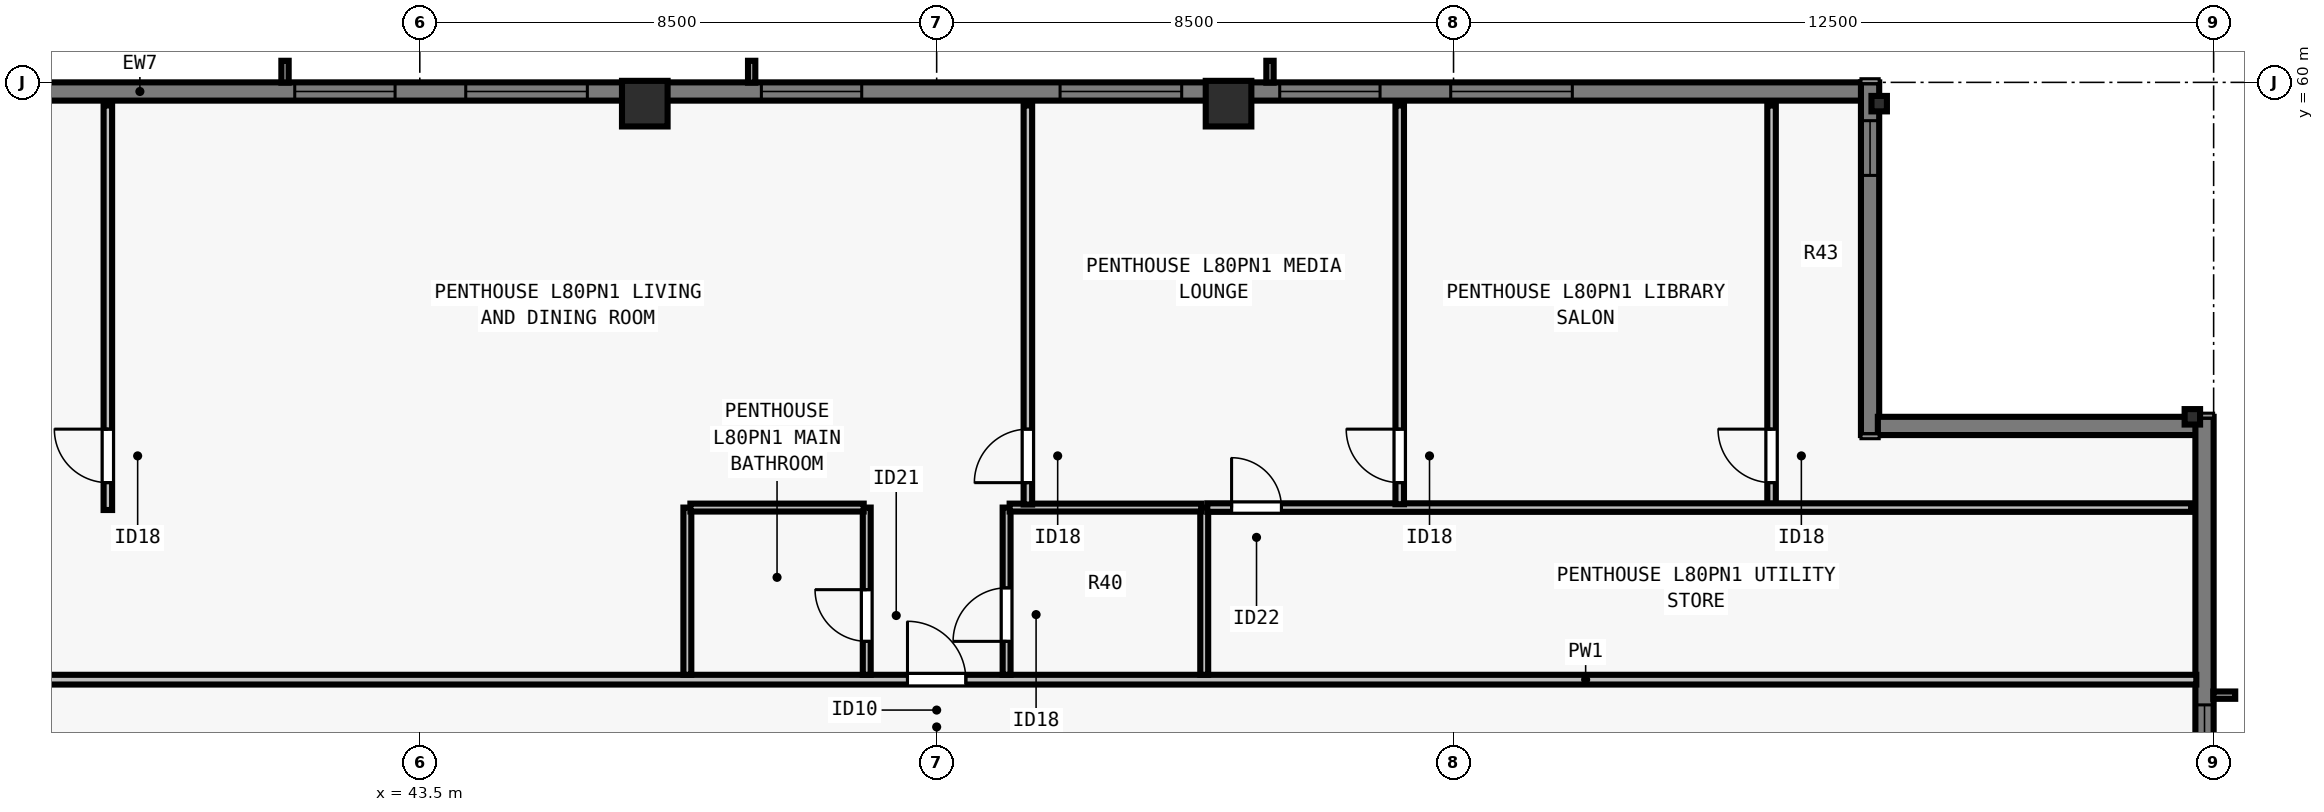
"""IFC4 building model, lengths in metres.
Left out: names, types, materials, properties, quantities, classifications, styles, units other than length and angle.
Written with IfcOpenShell. Run it as: python <this file> out.ifc"""

import sys

from ifc_helpers import new_model, si_unit, direction, frame, frame_2d, origin, origin_2d, place, context, subcontext, project, spatial, rectangle, i_section, extrude, element, fill, save


model = new_model("IFC4")
c1 = context("Model", 3, precision=1e-05, world=origin(), true_north=direction((0.0, 1.0)))
c2 = subcontext(c1, "Body", "Model", "MODEL_VIEW")
j1 = project(units=[si_unit("LENGTHUNIT", "METRE"), si_unit("PLANEANGLEUNIT", "RADIAN")], contexts=[c1])
p1 = place(None, origin())
s1 = spatial("IfcSite", under=j1, at=p1, CompositionType="ELEMENT")
p2 = place(p1, origin())
s2 = spatial("IfcBuilding", under=s1, at=p2, CompositionType="ELEMENT")
p3 = place(p2, frame((0.0, 0.0, 291.0)))
s3 = spatial("IfcBuildingStorey", under=s2, at=p3, CompositionType="ELEMENT", Elevation=291.0)
for number, where, z_axis, x_axis in (
    (1, (72.65, 54.5, 0.0), (0.0, 0.0, 1.0), (0.0, 1.0, 0.0)),
    (2, (67.5, 59.65, 0.0), (0.0, 0.0, 1.0), (1.0, 0.0, 0.0)),
):
    element("IfcColumn", number, at=place(p3, frame(where, z_axis=z_axis, x_axis=x_axis)), inside=s3, PredefinedType="COLUMN", context=c2, shape_type="SweptSolid", body=[
        extrude(i_section(OverallWidth=0.254, OverallDepth=0.254, WebThickness=0.009, FlangeThickness=0.014, FilletRadius=0.013, at=origin_2d()), origin(), (0.0, 0.0, 1.0), 3.5),
    ])
for number, where, z_axis, x_axis in (
    (3, (56.8, 59.65, 0.0), (0.0, 0.0, 1.0), (1.0, 0.0, 0.0)),
    (4, (47.2, 59.65, 0.0), (0.0, 0.0, 1.0), (1.0, 0.0, 0.0)),
):
    element("IfcColumn", number, at=place(p3, frame(where, z_axis=z_axis, x_axis=x_axis)), inside=s3, PredefinedType="COLUMN", context=c2, shape_type="SweptSolid", body=[
        extrude(rectangle(XDim=0.75, YDim=0.75, at=origin_2d()), origin(), (0.0, 0.0, 1.0), 3.5),
    ])
p4 = place(p3, frame((36.5, 59.85, 0.0), z_axis=(0.0, 0.0, 1.0), x_axis=(1.0, 0.0, 0.0)))
e5 = element("IfcWall", 5, at=p4, inside=s3, PredefinedType="SOLIDWALL", context=c2, shape_type="SweptSolid", body=[
    extrude(rectangle(XDim=30.722, YDim=0.3, at=frame_2d((15.361, 0.0))), origin(), (0.0, 0.0, 1.0), 3.29),
])
p5 = place(p4, frame((4.944, 0.0, 0.8)))
e6 = element("IfcOpeningElement", 6, at=p5, cuts=e5, PredefinedType="OPENING", context=c2, shape_type="SweptSolid", body=[
    extrude(rectangle(XDim=1.65, YDim=1.758, at=frame_2d((0.825, 0.879))), frame((0.0, 0.16, 0.0), z_axis=(0.0, -1.0, 0.0), x_axis=(1.0, 0.0, 0.0)), (0.0, 0.0, 1.0), 0.32),
])
p6 = place(p4, frame((7.756, 0.0, 0.8)))
e7 = element("IfcOpeningElement", 7, at=p6, cuts=e5, PredefinedType="OPENING", context=c2, shape_type="SweptSolid", body=[
    extrude(rectangle(XDim=2.0, YDim=1.758, at=frame_2d((1.0, 0.879))), frame((0.0, 0.16, 0.0), z_axis=(0.0, -1.0, 0.0), x_axis=(1.0, 0.0, 0.0)), (0.0, 0.0, 1.0), 0.32),
])
p7 = place(p4, frame((12.617, 0.0, 0.8)))
e8 = element("IfcOpeningElement", 8, at=p7, cuts=e5, PredefinedType="OPENING", context=c2, shape_type="SweptSolid", body=[
    extrude(rectangle(XDim=1.65, YDim=1.758, at=frame_2d((0.825, 0.879))), frame((0.0, 0.16, 0.0), z_axis=(0.0, -1.0, 0.0), x_axis=(1.0, 0.0, 0.0)), (0.0, 0.0, 1.0), 0.32),
])
p8 = place(p4, frame((17.53, 0.0, 0.8)))
e9 = element("IfcOpeningElement", 9, at=p8, cuts=e5, PredefinedType="OPENING", context=c2, shape_type="SweptSolid", body=[
    extrude(rectangle(XDim=2.0, YDim=1.758, at=frame_2d((1.0, 0.879))), frame((0.0, 0.16, 0.0), z_axis=(0.0, -1.0, 0.0), x_axis=(1.0, 0.0, 0.0)), (0.0, 0.0, 1.0), 0.32),
])
p9 = place(p4, frame((21.142, 0.0, 0.8)))
e10 = element("IfcOpeningElement", 10, at=p9, cuts=e5, PredefinedType="OPENING", context=c2, shape_type="SweptSolid", body=[
    extrude(rectangle(XDim=1.65, YDim=1.758, at=frame_2d((0.825, 0.879))), frame((0.0, 0.16, 0.0), z_axis=(0.0, -1.0, 0.0), x_axis=(1.0, 0.0, 0.0)), (0.0, 0.0, 1.0), 0.32),
])
p10 = place(p4, frame((23.954, 0.0, 0.8)))
e11 = element("IfcOpeningElement", 11, at=p10, cuts=e5, PredefinedType="OPENING", context=c2, shape_type="SweptSolid", body=[
    extrude(rectangle(XDim=2.0, YDim=1.758, at=frame_2d((1.0, 0.879))), frame((0.0, 0.16, 0.0), z_axis=(0.0, -1.0, 0.0), x_axis=(1.0, 0.0, 0.0)), (0.0, 0.0, 1.0), 0.32),
])
p11 = place(p3, frame((67.35, 60.0, 0.0), z_axis=(0.0, 0.0, 1.0), x_axis=(0.0, -1.0, 0.0)))
e12 = element("IfcWall", 12, at=p11, inside=s3, PredefinedType="SOLIDWALL", context=c2, shape_type="SweptSolid", body=[
    extrude(rectangle(XDim=5.8, YDim=0.3, at=frame_2d((2.9, 0.0))), origin(), (0.0, 0.0, 1.0), 3.29),
])
p12 = place(p11, frame((0.63, 0.0, 0.8)))
e13 = element("IfcOpeningElement", 13, at=p12, cuts=e12, PredefinedType="OPENING", context=c2, shape_type="SweptSolid", body=[
    extrude(rectangle(XDim=0.9, YDim=1.75, at=frame_2d((0.45, 0.875))), frame((0.0, 0.16, 0.0), z_axis=(0.0, -1.0, 0.0), x_axis=(1.0, 0.0, 0.0)), (0.0, 0.0, 1.0), 0.32),
])
p13 = place(p3, frame((67.478, 54.35, 0.0), z_axis=(0.0, 0.0, 1.0), x_axis=(1.0, 0.0, 0.0)))
e14 = element("IfcWall", 14, at=p13, inside=s3, PredefinedType="SOLIDWALL", context=c2, shape_type="SweptSolid", body=[
    extrude(rectangle(XDim=5.244, YDim=0.3, at=frame_2d((2.622, 0.0))), origin(), (0.0, 0.0, 1.0), 3.29),
])
p14 = place(p3, frame((72.85, 54.5, 0.0), z_axis=(0.0, 0.0, 1.0), x_axis=(0.0, -1.0, 0.0)))
e15 = element("IfcWall", 15, at=p14, inside=s3, PredefinedType="SOLIDWALL", context=c2, shape_type="SweptSolid", body=[
    extrude(rectangle(XDim=22.222, YDim=0.3, at=frame_2d((11.111, 0.0))), origin(), (0.0, 0.0, 1.0), 3.29),
])
p15 = place(p14, frame((4.737, 0.0, 0.8)))
e16 = element("IfcOpeningElement", 16, at=p15, cuts=e15, PredefinedType="OPENING", context=c2, shape_type="SweptSolid", body=[
    extrude(rectangle(XDim=1.65, YDim=1.758, at=frame_2d((0.825, 0.879))), frame((0.0, 0.16, 0.0), z_axis=(0.0, -1.0, 0.0), x_axis=(1.0, 0.0, 0.0)), (0.0, 0.0, 1.0), 0.32),
])
p16 = place(p14, frame((7.987, 0.0, 0.8)))
e17 = element("IfcOpeningElement", 17, at=p16, cuts=e15, PredefinedType="OPENING", context=c2, shape_type="SweptSolid", body=[
    extrude(rectangle(XDim=2.0, YDim=1.758, at=frame_2d((1.0, 0.879))), frame((0.0, 0.16, 0.0), z_axis=(0.0, -1.0, 0.0), x_axis=(1.0, 0.0, 0.0)), (0.0, 0.0, 1.0), 0.32),
])
p17 = place(p14, frame((11.586, 0.0, 0.8)))
e18 = element("IfcOpeningElement", 18, at=p17, cuts=e15, PredefinedType="OPENING", context=c2, shape_type="SweptSolid", body=[
    extrude(rectangle(XDim=1.65, YDim=1.758, at=frame_2d((0.825, 0.879))), frame((0.0, 0.16, 0.0), z_axis=(0.0, -1.0, 0.0), x_axis=(1.0, 0.0, 0.0)), (0.0, 0.0, 1.0), 0.32),
])
p18 = place(p14, frame((14.835, 0.0, 0.8)))
e19 = element("IfcOpeningElement", 19, at=p18, cuts=e15, PredefinedType="OPENING", context=c2, shape_type="SweptSolid", body=[
    extrude(rectangle(XDim=2.0, YDim=1.758, at=frame_2d((1.0, 0.879))), frame((0.0, 0.16, 0.0), z_axis=(0.0, -1.0, 0.0), x_axis=(1.0, 0.0, 0.0)), (0.0, 0.0, 1.0), 0.32),
])
p19 = place(p14, frame((17.985, 0.0, 0.8)))
e20 = element("IfcOpeningElement", 20, at=p19, cuts=e15, PredefinedType="OPENING", context=c2, shape_type="SweptSolid", body=[
    extrude(rectangle(XDim=1.65, YDim=1.758, at=frame_2d((0.825, 0.879))), frame((0.0, 0.16, 0.0), z_axis=(0.0, -1.0, 0.0), x_axis=(1.0, 0.0, 0.0)), (0.0, 0.0, 1.0), 0.32),
])
p20 = place(p3, frame((31.285, 50.177, 0.0), z_axis=(0.0, 0.0, 1.0), x_axis=(1.0, 0.0, 0.0)))
e21 = element("IfcWall", 21, at=p20, inside=s3, PredefinedType="PARTITIONING", context=c2, shape_type="SweptSolid", body=[
    extrude(rectangle(XDim=41.43, YDim=0.16, at=frame_2d((20.715, 0.0))), origin(), (0.0, 0.0, 1.0), 3.009),
])
p21 = place(p20, frame((20.235, 0.0, 0.0)))
e22 = element("IfcOpeningElement", 22, at=p21, cuts=e21, PredefinedType="OPENING", context=c2, shape_type="SweptSolid", body=[
    extrude(rectangle(XDim=0.96, YDim=2.18, at=frame_2d((0.48, 1.09))), frame((0.0, 0.09, 0.0), z_axis=(0.0, -1.0, 0.0), x_axis=(1.0, 0.0, 0.0)), (0.0, 0.0, 1.0), 0.18),
])
p22 = place(p3, frame((47.9, 50.258, 0.0), z_axis=(0.0, 0.0, 1.0), x_axis=(0.0, 1.0, 0.0)))
e23 = element("IfcWall", 23, at=p22, inside=s3, PredefinedType="PLUMBINGWALL", context=c2, shape_type="SweptSolid", body=[
    extrude(rectangle(XDim=2.75, YDim=0.13, at=frame_2d((1.375, 0.0))), origin(), (0.0, 0.0, 1.0), 3.29),
])
p23 = place(p3, frame((50.85, 50.258, 0.0), z_axis=(0.0, 0.0, 1.0), x_axis=(0.0, 1.0, 0.0)))
e24 = element("IfcWall", 24, at=p23, inside=s3, PredefinedType="PLUMBINGWALL", context=c2, shape_type="SweptSolid", body=[
    extrude(rectangle(XDim=2.75, YDim=0.13, at=frame_2d((1.375, 0.0))), origin(), (0.0, 0.0, 1.0), 3.009),
])
p24 = place(p23, frame((0.55, 0.0, 0.0)))
e25 = element("IfcOpeningElement", 25, at=p24, cuts=e24, PredefinedType="OPENING", context=c2, shape_type="SweptSolid", body=[
    extrude(rectangle(XDim=0.85, YDim=2.08, at=frame_2d((0.425, 1.04))), frame((0.0, 0.075, 0.0), z_axis=(0.0, -1.0, 0.0), x_axis=(1.0, 0.0, 0.0)), (0.0, 0.0, 1.0), 0.15),
])
p25 = place(p3, frame((47.95, 53.008, 0.0), z_axis=(0.0, 0.0, 1.0), x_axis=(1.0, 0.0, 0.0)))
e26 = element("IfcWall", 26, at=p25, inside=s3, PredefinedType="PLUMBINGWALL", context=c2, shape_type="SweptSolid", body=[
    extrude(rectangle(XDim=2.85, YDim=0.13, at=frame_2d((1.425, 0.0))), origin(), (0.0, 0.0, 1.0), 3.29),
])
p26 = place(p3, frame((56.4, 50.258, 0.0), z_axis=(0.0, 0.0, 1.0), x_axis=(0.0, 1.0, 0.0)))
e27 = element("IfcWall", 27, at=p26, inside=s3, PredefinedType="PLUMBINGWALL", context=c2, shape_type="SweptSolid", body=[
    extrude(rectangle(XDim=2.75, YDim=0.13, at=frame_2d((1.375, 0.0))), origin(), (0.0, 0.0, 1.0), 3.29),
])
p27 = place(p3, frame((53.15, 50.258, 0.0), z_axis=(0.0, 0.0, 1.0), x_axis=(0.0, 1.0, 0.0)))
e28 = element("IfcWall", 28, at=p27, inside=s3, PredefinedType="PLUMBINGWALL", context=c2, shape_type="SweptSolid", body=[
    extrude(rectangle(XDim=2.75, YDim=0.13, at=frame_2d((1.375, 0.0))), origin(), (0.0, 0.0, 1.0), 3.29),
])
p28 = place(p27, frame((0.55, 0.0, 0.0)))
e29 = element("IfcOpeningElement", 29, at=p28, cuts=e28, PredefinedType="OPENING", context=c2, shape_type="SweptSolid", body=[
    extrude(rectangle(XDim=0.88, YDim=2.1, at=frame_2d((0.44, 1.05))), frame((0.0, 0.075, 0.0), z_axis=(0.0, -1.0, 0.0), x_axis=(1.0, 0.0, 0.0)), (0.0, 0.0, 1.0), 0.15),
])
p29 = place(p3, frame((53.2, 53.008, 0.0), z_axis=(0.0, 0.0, 1.0), x_axis=(1.0, 0.0, 0.0)))
e30 = element("IfcWall", 30, at=p29, inside=s3, PredefinedType="PLUMBINGWALL", context=c2, shape_type="SweptSolid", body=[
    extrude(rectangle(XDim=3.15, YDim=0.13, at=frame_2d((1.575, 0.0))), origin(), (0.0, 0.0, 1.0), 3.29),
])
p30 = place(p3, frame((38.37, 52.968, 0.0), z_axis=(0.0, 0.0, 1.0), x_axis=(0.0, 1.0, 0.0)))
e31 = element("IfcWall", 31, at=p30, inside=s3, PredefinedType="PARTITIONING", context=c2, shape_type="SweptSolid", body=[
    extrude(rectangle(XDim=6.653, YDim=0.14, at=frame_2d((3.326, 0.0))), origin(), (0.0, 0.0, 1.0), 2.653),
])
p31 = place(p30, frame((0.45, 0.0, 0.0)))
e32 = element("IfcOpeningElement", 32, at=p31, cuts=e31, PredefinedType="OPENING", context=c2, shape_type="SweptSolid", body=[
    extrude(rectangle(XDim=0.88, YDim=2.1, at=frame_2d((0.44, 1.05))), frame((0.0, 0.08, 0.0), z_axis=(0.0, -1.0, 0.0), x_axis=(1.0, 0.0, 0.0)), (0.0, 0.0, 1.0), 0.16),
])
p32 = place(p3, frame((65.73, 52.968, 0.0), z_axis=(0.0, 0.0, 1.0), x_axis=(0.0, 1.0, 0.0)))
e33 = element("IfcWall", 33, at=p32, inside=s3, PredefinedType="PARTITIONING", context=c2, shape_type="SweptSolid", body=[
    extrude(rectangle(XDim=6.653, YDim=0.14, at=frame_2d((3.326, 0.0))), origin(), (0.0, 0.0, 1.0), 2.653),
])
p33 = place(p32, frame((0.45, 0.0, 0.0)))
e34 = element("IfcOpeningElement", 34, at=p33, cuts=e33, PredefinedType="OPENING", context=c2, shape_type="SweptSolid", body=[
    extrude(rectangle(XDim=0.88, YDim=2.1, at=frame_2d((0.44, 1.05))), frame((0.0, 0.08, 0.0), z_axis=(0.0, -1.0, 0.0), x_axis=(1.0, 0.0, 0.0)), (0.0, 0.0, 1.0), 0.16),
])
p34 = place(p3, frame((56.45, 53.008, 0.0), z_axis=(0.0, 0.0, 1.0), x_axis=(1.0, 0.0, 0.0)))
e35 = element("IfcWall", 35, at=p34, inside=s3, PredefinedType="PARTITIONING", context=c2, shape_type="SweptSolid", body=[
    extrude(rectangle(XDim=16.18, YDim=0.14, at=frame_2d((8.09, 0.0))), origin(), (0.0, 0.0, 1.0), 3.009),
])
p35 = place(p34, frame((0.4, 0.0, 0.0)))
e36 = element("IfcOpeningElement", 36, at=p35, cuts=e35, PredefinedType="OPENING", context=c2, shape_type="SweptSolid", body=[
    extrude(rectangle(XDim=0.82, YDim=2.1, at=frame_2d((0.41, 1.05))), frame((0.0, 0.08, 0.0), z_axis=(0.0, -1.0, 0.0), x_axis=(1.0, 0.0, 0.0)), (0.0, 0.0, 1.0), 0.16),
])
p36 = place(p3, frame((53.5, 53.058, 0.0), z_axis=(0.0, 0.0, 1.0), x_axis=(0.0, 1.0, 0.0)))
e37 = element("IfcWall", 37, at=p36, inside=s3, PredefinedType="PARTITIONING", context=c2, shape_type="SweptSolid", body=[
    extrude(rectangle(XDim=6.562, YDim=0.14, at=frame_2d((3.281, 0.0))), origin(), (0.0, 0.0, 1.0), 3.009),
])
p37 = place(p36, frame((0.36, 0.0, 0.0)))
e38 = element("IfcOpeningElement", 38, at=p37, cuts=e37, PredefinedType="OPENING", context=c2, shape_type="SweptSolid", body=[
    extrude(rectangle(XDim=0.88, YDim=2.1, at=frame_2d((0.44, 1.05))), frame((0.0, 0.08, 0.0), z_axis=(0.0, -1.0, 0.0), x_axis=(1.0, 0.0, 0.0)), (0.0, 0.0, 1.0), 0.16),
])
p38 = place(p3, frame((59.615, 53.062, 0.0), z_axis=(0.0, 0.0, 1.0), x_axis=(0.0, 1.0, 0.0)))
e39 = element("IfcWall", 39, at=p38, inside=s3, PredefinedType="PARTITIONING", context=c2, shape_type="SweptSolid", body=[
    extrude(rectangle(XDim=6.558, YDim=0.14, at=frame_2d((3.279, 0.0))), origin(), (0.0, 0.0, 1.0), 3.29),
])
p39 = place(p38, frame((0.355, 0.0, 0.0)))
e40 = element("IfcOpeningElement", 40, at=p39, cuts=e39, PredefinedType="OPENING", context=c2, shape_type="SweptSolid", body=[
    extrude(rectangle(XDim=0.88, YDim=2.1, at=frame_2d((0.44, 1.05))), frame((0.0, 0.08, 0.0), z_axis=(0.0, -1.0, 0.0), x_axis=(1.0, 0.0, 0.0)), (0.0, 0.0, 1.0), 0.16),
])
p40 = place(p5, origin())
e41 = element("IfcWindow", 41, at=p40, inside=s3, PartitioningType="SINGLE_PANEL", PredefinedType="WINDOW", context=c2, shape_type="SweptSolid", body=[
    extrude(rectangle(XDim=1.65, YDim=1.758, at=frame_2d((0.825, 0.879))), frame((0.0, -0.05, 0.0), z_axis=(0.0, -1.0, 0.0), x_axis=(1.0, 0.0, 0.0)), (0.0, 0.0, 1.0), 0.06),
])
fill(e6, e41)
p41 = place(p6, origin())
e42 = element("IfcWindow", 42, at=p41, inside=s3, PartitioningType="SINGLE_PANEL", PredefinedType="WINDOW", context=c2, shape_type="SweptSolid", body=[
    extrude(rectangle(XDim=2.0, YDim=1.758, at=frame_2d((1.0, 0.879))), frame((0.0, -0.05, 0.0), z_axis=(0.0, -1.0, 0.0), x_axis=(1.0, 0.0, 0.0)), (0.0, 0.0, 1.0), 0.06),
])
fill(e7, e42)
p42 = place(p7, origin())
e43 = element("IfcWindow", 43, at=p42, inside=s3, PartitioningType="SINGLE_PANEL", PredefinedType="WINDOW", context=c2, shape_type="SweptSolid", body=[
    extrude(rectangle(XDim=1.65, YDim=1.758, at=frame_2d((0.825, 0.879))), frame((0.0, -0.05, 0.0), z_axis=(0.0, -1.0, 0.0), x_axis=(1.0, 0.0, 0.0)), (0.0, 0.0, 1.0), 0.06),
])
fill(e8, e43)
p43 = place(p8, origin())
e44 = element("IfcWindow", 44, at=p43, inside=s3, PartitioningType="SINGLE_PANEL", PredefinedType="WINDOW", context=c2, shape_type="SweptSolid", body=[
    extrude(rectangle(XDim=2.0, YDim=1.758, at=frame_2d((1.0, 0.879))), frame((0.0, -0.05, 0.0), z_axis=(0.0, -1.0, 0.0), x_axis=(1.0, 0.0, 0.0)), (0.0, 0.0, 1.0), 0.06),
])
fill(e9, e44)
p44 = place(p9, origin())
e45 = element("IfcWindow", 45, at=p44, inside=s3, PartitioningType="SINGLE_PANEL", PredefinedType="WINDOW", context=c2, shape_type="SweptSolid", body=[
    extrude(rectangle(XDim=1.65, YDim=1.758, at=frame_2d((0.825, 0.879))), frame((0.0, -0.05, 0.0), z_axis=(0.0, -1.0, 0.0), x_axis=(1.0, 0.0, 0.0)), (0.0, 0.0, 1.0), 0.06),
])
fill(e10, e45)
p45 = place(p10, origin())
e46 = element("IfcWindow", 46, at=p45, inside=s3, PartitioningType="SINGLE_PANEL", PredefinedType="WINDOW", context=c2, shape_type="SweptSolid", body=[
    extrude(rectangle(XDim=2.0, YDim=1.758, at=frame_2d((1.0, 0.879))), frame((0.0, -0.05, 0.0), z_axis=(0.0, -1.0, 0.0), x_axis=(1.0, 0.0, 0.0)), (0.0, 0.0, 1.0), 0.06),
])
fill(e11, e46)
p46 = place(p15, origin())
e47 = element("IfcWindow", 47, at=p46, inside=s3, PartitioningType="SINGLE_PANEL", PredefinedType="WINDOW", context=c2, shape_type="SweptSolid", body=[
    extrude(rectangle(XDim=1.65, YDim=1.758, at=frame_2d((0.825, 0.879))), frame((0.0, -0.05, 0.0), z_axis=(0.0, -1.0, 0.0), x_axis=(1.0, 0.0, 0.0)), (0.0, 0.0, 1.0), 0.06),
])
fill(e16, e47)
p47 = place(p12, origin())
e48 = element("IfcWindow", 48, at=p47, inside=s3, PartitioningType="SINGLE_PANEL", PredefinedType="WINDOW", context=c2, shape_type="SweptSolid", body=[
    extrude(rectangle(XDim=0.9, YDim=1.75, at=frame_2d((0.45, 0.875))), frame((0.0, -0.04, 0.0), z_axis=(0.0, -1.0, 0.0), x_axis=(1.0, 0.0, 0.0)), (0.0, 0.0, 1.0), 0.06),
])
fill(e13, e48)
p48 = place(p24, origin())
e49 = element("IfcDoor", 49, at=p48, inside=s3, OperationType="SINGLE_SWING_RIGHT", PredefinedType="DOOR", context=c2, shape_type="SweptSolid", body=[
    extrude(rectangle(XDim=0.85, YDim=2.08, at=frame_2d((0.425, 1.04))), frame((0.0, 0.025, 0.0), z_axis=(0.0, -1.0, 0.0), x_axis=(1.0, 0.0, 0.0)), (0.0, 0.0, 1.0), 0.05),
])
fill(e25, e49)
p49 = place(p28, origin())
e50 = element("IfcDoor", 50, at=p49, inside=s3, OperationType="SINGLE_SWING_LEFT", PredefinedType="DOOR", context=c2, shape_type="SweptSolid", body=[
    extrude(rectangle(XDim=0.88, YDim=2.1, at=frame_2d((0.44, 1.05))), frame((0.0, 0.025, 0.0), z_axis=(0.0, -1.0, 0.0), x_axis=(1.0, 0.0, 0.0)), (0.0, 0.0, 1.0), 0.05),
])
fill(e29, e50)
p50 = place(p31, origin())
e51 = element("IfcDoor", 51, at=p50, inside=s3, OperationType="SINGLE_SWING_RIGHT", PredefinedType="DOOR", context=c2, shape_type="SweptSolid", body=[
    extrude(rectangle(XDim=0.88, YDim=2.1, at=frame_2d((0.44, 1.05))), frame((0.0, 0.025, 0.0), z_axis=(0.0, -1.0, 0.0), x_axis=(1.0, 0.0, 0.0)), (0.0, 0.0, 1.0), 0.05),
])
fill(e32, e51)
p51 = place(p35, origin())
e52 = element("IfcDoor", 52, at=p51, inside=s3, OperationType="SINGLE_SWING_LEFT", PredefinedType="DOOR", context=c2, shape_type="SweptSolid", body=[
    extrude(rectangle(XDim=0.82, YDim=2.1, at=frame_2d((0.41, 1.05))), frame((0.0, 0.025, 0.0), z_axis=(0.0, -1.0, 0.0), x_axis=(1.0, 0.0, 0.0)), (0.0, 0.0, 1.0), 0.05),
])
fill(e36, e52)
p52 = place(p33, origin())
e53 = element("IfcDoor", 53, at=p52, inside=s3, OperationType="SINGLE_SWING_RIGHT", PredefinedType="DOOR", context=c2, shape_type="SweptSolid", body=[
    extrude(rectangle(XDim=0.88, YDim=2.1, at=frame_2d((0.44, 1.05))), frame((0.0, 0.025, 0.0), z_axis=(0.0, -1.0, 0.0), x_axis=(1.0, 0.0, 0.0)), (0.0, 0.0, 1.0), 0.05),
])
fill(e34, e53)
p53 = place(p37, origin())
e54 = element("IfcDoor", 54, at=p53, inside=s3, OperationType="SINGLE_SWING_LEFT", PredefinedType="DOOR", context=c2, shape_type="SweptSolid", body=[
    extrude(rectangle(XDim=0.88, YDim=2.1, at=frame_2d((0.44, 1.05))), frame((0.0, 0.025, 0.0), z_axis=(0.0, -1.0, 0.0), x_axis=(1.0, 0.0, 0.0)), (0.0, 0.0, 1.0), 0.05),
])
fill(e38, e54)
p54 = place(p39, origin())
e55 = element("IfcDoor", 55, at=p54, inside=s3, OperationType="SINGLE_SWING_RIGHT", PredefinedType="DOOR", context=c2, shape_type="SweptSolid", body=[
    extrude(rectangle(XDim=0.88, YDim=2.1, at=frame_2d((0.44, 1.05))), frame((0.0, 0.025, 0.0), z_axis=(0.0, -1.0, 0.0), x_axis=(1.0, 0.0, 0.0)), (0.0, 0.0, 1.0), 0.05),
])
fill(e40, e55)
p55 = place(p21, origin())
e56 = element("IfcDoor", 56, at=p55, inside=s3, OperationType="SINGLE_SWING_LEFT", PredefinedType="DOOR", context=c2, shape_type="SweptSolid", body=[
    extrude(rectangle(XDim=0.96, YDim=2.18, at=frame_2d((0.48, 1.09))), frame((0.0, 0.025, 0.0), z_axis=(0.0, -1.0, 0.0), x_axis=(1.0, 0.0, 0.0)), (0.0, 0.0, 1.0), 0.05),
])
fill(e22, e56)
save(model, sys.argv[1])
